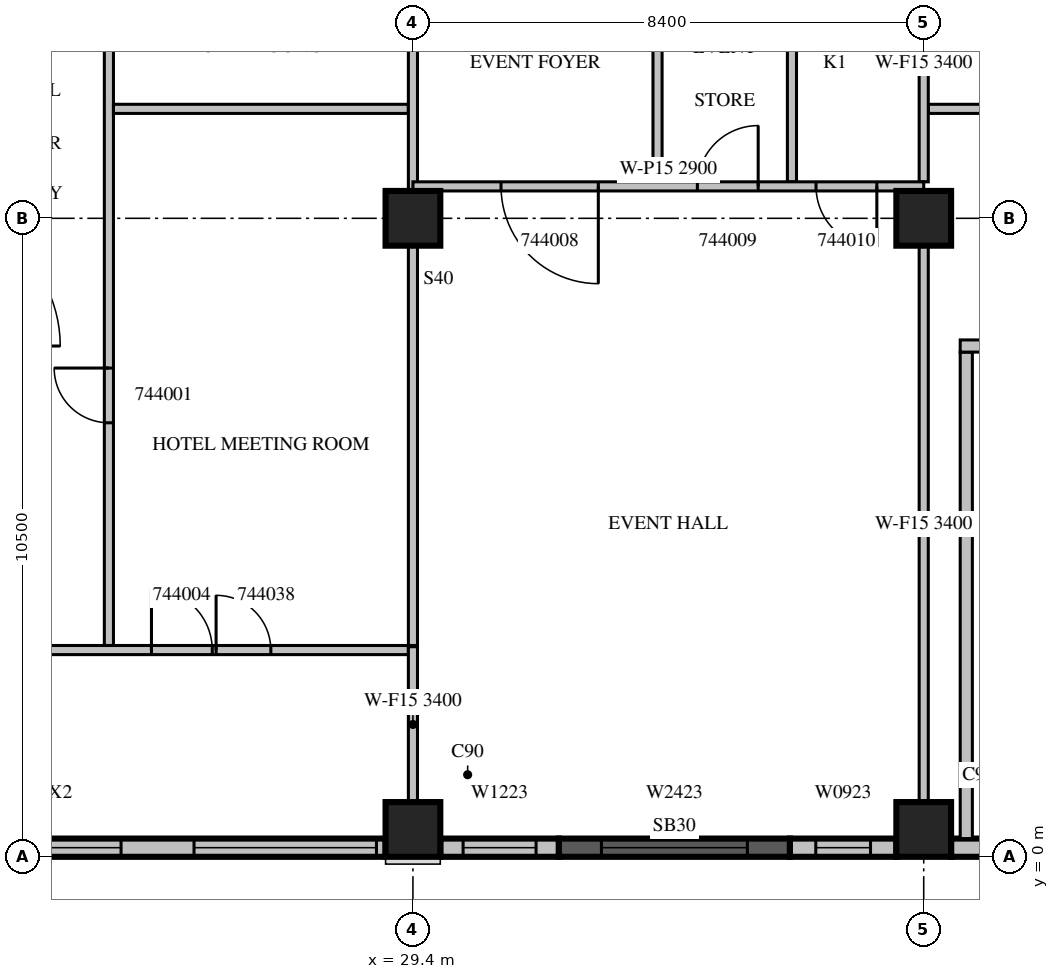
"""IFC4 building model, lengths in metres.
Left out: names, types, materials, properties, quantities, classifications, styles, units other than length and angle.
Written with IfcOpenShell. Run it as: python <this file> out.ifc"""

import sys

from ifc_helpers import new_model, si_unit, direction, frame, frame_2d, origin, origin_2d, place, context, subcontext, project, spatial, rectangle, extrude, source, transform, mapped, element, fill, save


model = new_model("IFC4")
c1 = context("Model", 3, precision=1e-05, world=origin(), true_north=direction((0.0, 1.0)))
c2 = subcontext(c1, "Body", "Model", "MODEL_VIEW")
j1 = project(units=[si_unit("LENGTHUNIT", "METRE"), si_unit("PLANEANGLEUNIT", "RADIAN")], contexts=[c1])
p1 = place(None, origin())
s1 = spatial("IfcSite", under=j1, at=p1, CompositionType="ELEMENT")
p2 = place(p1, origin())
s2 = spatial("IfcBuilding", under=s1, at=p2, CompositionType="ELEMENT")
p3 = place(p2, frame((0.0, 0.0, 200.6)))
s3 = spatial("IfcBuildingStorey", under=s2, at=p3, CompositionType="ELEMENT", Elevation=200.6)
m1 = source(origin(), c2, "Body", "SweptSolid", [
    extrude(rectangle(XDim=0.9, YDim=0.9, at=origin_2d()), origin(), (0.0, 0.0, 1.0), 3.8),
])
for number, where, z_axis, x_axis in (
    (1, (29.4, 0.45, 0.0), (0.0, 0.0, 1.0), (1.0, 0.0, 0.0)),
    (2, (37.8, 0.45, 0.0), (0.0, 0.0, 1.0), (1.0, 0.0, 0.0)),
    (3, (29.4, 10.5, 0.0), (0.0, 0.0, 1.0), (1.0, 0.0, 0.0)),
    (4, (37.8, 10.5, 0.0), (0.0, 0.0, 1.0), (1.0, 0.0, 0.0)),
):
    element("IfcColumn", number, at=place(p3, frame(where, z_axis=z_axis, x_axis=x_axis)), inside=s3, PredefinedType="COLUMN", context=c2, shape_type="MappedRepresentation", body=[
        mapped(m1, transform((0.0, 0.0, 0.0), scale=1.0)),
    ])
m2 = source(origin(), c2, "Body", "SweptSolid", [
    extrude(rectangle(XDim=7.5, YDim=0.3, at=frame_2d((3.75, 0.0))), origin(), (0.0, 0.0, 1.0), 3.4),
])
p4 = place(p3, frame((21.45, 0.15, 0.0), z_axis=(0.0, 0.0, 1.0), x_axis=(1.0, 0.0, 0.0)))
e5 = element("IfcWall", 5, at=p4, inside=s3, PredefinedType="STANDARD", context=c2, shape_type="MappedRepresentation", body=[
    mapped(m2, transform((0.0, 0.0, 0.0), scale=1.0)),
])
m3 = source(origin(), c2, "Body", "SweptSolid", [
    extrude(rectangle(XDim=3.0, YDim=2.3, at=frame_2d((1.5, 1.15))), frame((0.0, 0.16, 0.0), z_axis=(0.0, -1.0, 0.0), x_axis=(1.0, 0.0, 0.0)), (0.0, 0.0, 1.0), 0.32),
])
p5 = place(p4, frame((0.15, 0.0, 0.6)))
e6 = element("IfcOpeningElement", 6, at=p5, cuts=e5, PredefinedType="OPENING", context=c2, shape_type="MappedRepresentation", body=[
    mapped(m3, transform((0.0, 0.0, 0.0), scale=1.0)),
])
p6 = place(p4, frame((4.35, 0.0, 0.6)))
e7 = element("IfcOpeningElement", 7, at=p6, cuts=e5, PredefinedType="OPENING", context=c2, shape_type="MappedRepresentation", body=[
    mapped(m3, transform((0.0, 0.0, 0.0), scale=1.0)),
])
m4 = source(origin(), c2, "Body", "SweptSolid", [
    extrude(rectangle(XDim=1.95, YDim=0.3, at=frame_2d((0.975, 0.0))), origin(), (0.0, 0.0, 1.0), 3.4),
])
p7 = place(p3, frame((29.85, 0.15, 0.0), z_axis=(0.0, 0.0, 1.0), x_axis=(1.0, 0.0, 0.0)))
e8 = element("IfcWall", 8, at=p7, inside=s3, PredefinedType="STANDARD", context=c2, shape_type="MappedRepresentation", body=[
    mapped(m4, transform((0.0, 0.0, 0.0), scale=1.0)),
])
m5 = source(origin(), c2, "Body", "SweptSolid", [
    extrude(rectangle(XDim=1.2, YDim=2.3, at=frame_2d((0.6, 1.15))), frame((0.0, 0.16, 0.0), z_axis=(0.0, -1.0, 0.0), x_axis=(1.0, 0.0, 0.0)), (0.0, 0.0, 1.0), 0.32),
])
p8 = place(p7, frame((0.375, 0.0, 0.6)))
e9 = element("IfcOpeningElement", 9, at=p8, cuts=e8, PredefinedType="OPENING", context=c2, shape_type="MappedRepresentation", body=[
    mapped(m5, transform((0.0, 0.0, 0.0), scale=1.0)),
])
m6 = source(origin(), c2, "Body", "SweptSolid", [
    extrude(rectangle(XDim=3.8, YDim=0.3, at=frame_2d((1.9, 0.0))), origin(), (0.0, 0.0, 1.0), 3.4),
])
p9 = place(p3, frame((31.8, 0.15, 0.0), z_axis=(0.0, 0.0, 1.0), x_axis=(1.0, 0.0, 0.0)))
e10 = element("IfcWall", 10, at=p9, inside=s3, PredefinedType="SOLIDWALL", context=c2, shape_type="MappedRepresentation", body=[
    mapped(m6, transform((0.0, 0.0, 0.0), scale=1.0)),
])
m7 = source(origin(), c2, "Body", "SweptSolid", [
    extrude(rectangle(XDim=2.4, YDim=2.3, at=frame_2d((1.2, 1.15))), frame((0.0, 0.16, 0.0), z_axis=(0.0, -1.0, 0.0), x_axis=(1.0, 0.0, 0.0)), (0.0, 0.0, 1.0), 0.32),
])
p10 = place(p9, frame((0.7, 0.0, 0.6)))
e11 = element("IfcOpeningElement", 11, at=p10, cuts=e10, PredefinedType="OPENING", context=c2, shape_type="MappedRepresentation", body=[
    mapped(m7, transform((0.0, 0.0, 0.0), scale=1.0)),
])
m8 = source(origin(), c2, "Body", "SweptSolid", [
    extrude(rectangle(XDim=1.75, YDim=0.3, at=frame_2d((0.875, 0.0))), origin(), (0.0, 0.0, 1.0), 3.4),
])
p11 = place(p3, frame((35.6, 0.15, 0.0), z_axis=(0.0, 0.0, 1.0), x_axis=(1.0, 0.0, 0.0)))
e12 = element("IfcWall", 12, at=p11, inside=s3, PredefinedType="STANDARD", context=c2, shape_type="MappedRepresentation", body=[
    mapped(m8, transform((0.0, 0.0, 0.0), scale=1.0)),
])
m9 = source(origin(), c2, "Body", "SweptSolid", [
    extrude(rectangle(XDim=0.9, YDim=2.3, at=frame_2d((0.45, 1.15))), frame((0.0, 0.16, 0.0), z_axis=(0.0, -1.0, 0.0), x_axis=(1.0, 0.0, 0.0)), (0.0, 0.0, 1.0), 0.32),
])
p12 = place(p11, frame((0.425, 0.0, 0.6)))
e13 = element("IfcOpeningElement", 13, at=p12, cuts=e12, PredefinedType="OPENING", context=c2, shape_type="MappedRepresentation", body=[
    mapped(m9, transform((0.0, 0.0, 0.0), scale=1.0)),
])
p13 = place(p3, frame((38.25, 0.15, 0.0), z_axis=(0.0, 0.0, 1.0), x_axis=(1.0, 0.0, 0.0)))
e14 = element("IfcWall", 14, at=p13, inside=s3, PredefinedType="STANDARD", context=c2, shape_type="MappedRepresentation", body=[
    mapped(m4, transform((0.0, 0.0, 0.0), scale=1.0)),
])
m10 = source(origin(), c2, "Body", "SweptSolid", [
    extrude(rectangle(XDim=8.0, YDim=0.2, at=frame_2d((4.0, 0.0))), origin(), (0.0, 0.0, 1.0), 3.4),
])
p14 = place(p3, frame((38.5, 0.3, 0.0), z_axis=(0.0, 0.0, 1.0), x_axis=(0.0, 1.0, 0.0)))
e15 = element("IfcWall", 15, at=p14, inside=s3, PredefinedType="PARTITIONING", context=c2, shape_type="MappedRepresentation", body=[
    mapped(m10, transform((0.0, 0.0, 0.0), scale=1.0)),
])
m11 = source(origin(), c2, "Body", "SweptSolid", [
    extrude(rectangle(XDim=5.45, YDim=0.2, at=frame_2d((2.725, 0.0))), origin(), (0.0, 0.0, 1.0), 3.4),
])
p15 = place(p3, frame((38.4, 8.4, 0.0), z_axis=(0.0, 0.0, 1.0), x_axis=(1.0, 0.0, 0.0)))
e16 = element("IfcWall", 16, at=p15, inside=s3, PredefinedType="PARTITIONING", context=c2, shape_type="MappedRepresentation", body=[
    mapped(m11, transform((0.0, 0.0, 0.0), scale=1.0)),
])
m12 = source(origin(), c2, "Body", "SweptSolid", [
    extrude(rectangle(XDim=1.2, YDim=2.1, at=frame_2d((0.6, 1.05))), frame((0.0, 0.11, 0.0), z_axis=(0.0, -1.0, 0.0), x_axis=(1.0, 0.0, 0.0)), (0.0, 0.0, 1.0), 0.22),
])
p16 = place(p15, frame((0.4, 0.0, 0.0)))
e17 = element("IfcOpeningElement", 17, at=p16, cuts=e16, PredefinedType="OPENING", context=c2, shape_type="MappedRepresentation", body=[
    mapped(m12, transform((0.0, 0.0, 0.0), scale=1.0)),
])
m13 = source(origin(), c2, "Body", "SweptSolid", [
    extrude(rectangle(XDim=0.9, YDim=2.1, at=frame_2d((0.45, 1.05))), frame((0.0, 0.11, 0.0), z_axis=(0.0, -1.0, 0.0), x_axis=(1.0, 0.0, 0.0)), (0.0, 0.0, 1.0), 0.22),
])
p17 = place(p15, frame((3.25, 0.0, 0.0)))
e18 = element("IfcOpeningElement", 18, at=p17, cuts=e16, PredefinedType="OPENING", context=c2, shape_type="MappedRepresentation", body=[
    mapped(m13, transform((0.0, 0.0, 0.0), scale=1.0)),
])
m14 = source(origin(), c2, "Body", "SweptSolid", [
    extrude(rectangle(XDim=11.525, YDim=0.15, at=frame_2d((5.763, 0.0))), origin(), (0.0, 0.0, 1.0), 3.4),
])
p18 = place(p3, frame((24.4, 15.0, 0.0), z_axis=(0.0, 0.0, 1.0), x_axis=(0.0, -1.0, 0.0)))
e19 = element("IfcWall", 19, at=p18, inside=s3, PredefinedType="PARTITIONING", context=c2, shape_type="MappedRepresentation", body=[
    mapped(m14, transform((0.0, 0.0, 0.0), scale=1.0)),
])
m15 = source(origin(), c2, "Body", "SweptSolid", [
    extrude(rectangle(XDim=0.9, YDim=2.1, at=frame_2d((0.45, 1.05))), frame((0.0, 0.085, 0.0), z_axis=(0.0, -1.0, 0.0), x_axis=(1.0, 0.0, 0.0)), (0.0, 0.0, 1.0), 0.17),
])
p19 = place(p18, frame((6.963, 0.0, 0.0)))
e20 = element("IfcOpeningElement", 20, at=p19, cuts=e19, PredefinedType="OPENING", context=c2, shape_type="MappedRepresentation", body=[
    mapped(m15, transform((0.0, 0.0, 0.0), scale=1.0)),
])
p20 = place(p18, frame((0.325, 0.0, 0.0)))
e21 = element("IfcOpeningElement", 21, at=p20, cuts=e19, PredefinedType="OPENING", context=c2, shape_type="MappedRepresentation", body=[
    mapped(m15, transform((0.0, 0.0, 0.0), scale=1.0)),
])
p21 = place(p3, frame((29.325, 12.3, 0.0), z_axis=(0.0, 0.0, 1.0), x_axis=(-1.0, 0.0, 0.0)))
e22 = element("IfcWall", 22, at=p21, inside=s3, PredefinedType="PARTITIONING", context=c2, shape_type="SweptSolid", body=[
    extrude(rectangle(XDim=4.85, YDim=0.15, at=frame_2d((2.425, 0.0))), origin(), (0.0, 0.0, 1.0), 3.4),
])
m16 = source(origin(), c2, "Body", "SweptSolid", [
    extrude(rectangle(XDim=6.576, YDim=0.15, at=frame_2d((3.288, 0.0))), origin(), (0.0, 0.0, 1.0), 3.4),
])
p22 = place(p3, frame((29.4, 3.475, 0.0), z_axis=(0.0, 0.0, 1.0), x_axis=(0.0, 1.0, 0.0)))
e23 = element("IfcWall", 23, at=p22, inside=s3, PredefinedType="PARTITIONING", context=c2, shape_type="MappedRepresentation", body=[
    mapped(m16, transform((0.0, 0.0, 0.0), scale=1.0)),
])
m17 = source(origin(), c2, "Body", "SweptSolid", [
    extrude(rectangle(XDim=4.051, YDim=0.15, at=frame_2d((2.026, 0.0))), origin(), (0.0, 0.0, 1.0), 3.4),
])
p23 = place(p3, frame((29.4, 10.949, 0.0), z_axis=(0.0, 0.0, 1.0), x_axis=(0.0, 1.0, 0.0)))
e24 = element("IfcWall", 24, at=p23, inside=s3, PredefinedType="PARTITIONING", context=c2, shape_type="MappedRepresentation", body=[
    mapped(m17, transform((0.0, 0.0, 0.0), scale=1.0)),
])
m18 = source(origin(), c2, "Body", "SweptSolid", [
    extrude(rectangle(XDim=7.525, YDim=0.15, at=frame_2d((3.763, 0.0))), origin(), (0.0, 0.0, 1.0), 3.4),
])
p24 = place(p3, frame((21.8, 3.4, 0.0), z_axis=(0.0, 0.0, 1.0), x_axis=(1.0, 0.0, 0.0)))
e25 = element("IfcWall", 25, at=p24, inside=s3, PredefinedType="PARTITIONING", context=c2, shape_type="MappedRepresentation", body=[
    mapped(m18, transform((0.0, 0.0, 0.0), scale=1.0)),
])
m19 = source(origin(), c2, "Body", "SweptSolid", [
    extrude(rectangle(XDim=1.0, YDim=2.1, at=frame_2d((0.5, 1.05))), frame((0.0, 0.085, 0.0), z_axis=(0.0, -1.0, 0.0), x_axis=(1.0, 0.0, 0.0)), (0.0, 0.0, 1.0), 0.17),
])
p25 = place(p24, frame((3.3, 0.0, 0.0)))
e26 = element("IfcOpeningElement", 26, at=p25, cuts=e25, PredefinedType="OPENING", context=c2, shape_type="MappedRepresentation", body=[
    mapped(m19, transform((0.0, 0.0, 0.0), scale=1.0)),
])
p26 = place(p24, frame((4.363, 0.0, 0.0)))
e27 = element("IfcOpeningElement", 27, at=p26, cuts=e25, PredefinedType="OPENING", context=c2, shape_type="MappedRepresentation", body=[
    mapped(m15, transform((0.0, 0.0, 0.0), scale=1.0)),
])
m20 = source(origin(), c2, "Body", "SweptSolid", [
    extrude(rectangle(XDim=6.45, YDim=0.15, at=frame_2d((3.225, 0.0))), origin(), (0.0, 0.0, 1.0), 3.4),
])
p27 = place(p3, frame((37.875, 12.3, 0.0), z_axis=(0.0, 0.0, 1.0), x_axis=(1.0, 0.0, 0.0)))
e28 = element("IfcWall", 28, at=p27, inside=s3, PredefinedType="PARTITIONING", context=c2, shape_type="MappedRepresentation", body=[
    mapped(m20, transform((0.0, 0.0, 0.0), scale=1.0)),
])
m21 = source(origin(), c2, "Body", "SweptSolid", [
    extrude(rectangle(XDim=3.9, YDim=0.15, at=frame_2d((1.95, 0.0))), origin(), (0.0, 0.0, 1.0), 3.4),
])
for number, where, z_axis, x_axis in (
    (29, (33.422, 11.1, 0.0), (0.0, 0.0, 1.0), (0.0, 1.0, 0.0)),
    (30, (35.633, 11.1, 0.0), (0.0, 0.0, 1.0), (0.0, 1.0, 0.0)),
):
    element("IfcWall", number, at=place(p3, frame(where, z_axis=z_axis, x_axis=x_axis)), inside=s3, PredefinedType="PARTITIONING", context=c2, shape_type="MappedRepresentation", body=[
        mapped(m21, transform((0.0, 0.0, 0.0), scale=1.0)),
    ])
m22 = source(origin(), c2, "Body", "SweptSolid", [
    extrude(rectangle(XDim=2.556, YDim=0.15, at=frame_2d((1.278, 0.0))), origin(), (0.0, 0.0, 1.0), 3.4),
])
p28 = place(p3, frame((29.4, 0.899, 0.0), z_axis=(0.0, 0.0, 1.0), x_axis=(0.0, 1.0, 0.0)))
e31 = element("IfcWall", 31, at=p28, inside=s3, PredefinedType="PARTITIONING", context=c2, shape_type="MappedRepresentation", body=[
    mapped(m22, transform((0.0, 0.0, 0.0), scale=1.0)),
])
m23 = source(origin(), c2, "Body", "SweptSolid", [
    extrude(rectangle(XDim=9.152, YDim=0.15, at=frame_2d((4.576, 0.0))), origin(), (0.0, 0.0, 1.0), 3.4),
])
p29 = place(p3, frame((37.8, 0.899, 0.0), z_axis=(0.0, 0.0, 1.0), x_axis=(0.0, 1.0, 0.0)))
e32 = element("IfcWall", 32, at=p29, inside=s3, PredefinedType="PARTITIONING", context=c2, shape_type="MappedRepresentation", body=[
    mapped(m23, transform((0.0, 0.0, 0.0), scale=1.0)),
])
p30 = place(p3, frame((37.8, 11.1, 0.0), z_axis=(0.0, 0.0, 1.0), x_axis=(0.0, 1.0, 0.0)))
e33 = element("IfcWall", 33, at=p30, inside=s3, PredefinedType="PARTITIONING", context=c2, shape_type="MappedRepresentation", body=[
    mapped(m21, transform((0.0, 0.0, 0.0), scale=1.0)),
])
m24 = source(origin(), c2, "Body", "SweptSolid", [
    extrude(rectangle(XDim=8.4, YDim=0.15, at=frame_2d((4.2, 0.0))), origin(), (0.0, 0.0, 1.0), 2.9),
])
p31 = place(p3, frame((37.8, 11.025, 0.0), z_axis=(0.0, 0.0, 1.0), x_axis=(-1.0, 0.0, 0.0)))
e34 = element("IfcWall", 34, at=p31, inside=s3, PredefinedType="PARTITIONING", context=c2, shape_type="MappedRepresentation", body=[
    mapped(m24, transform((0.0, 0.0, 0.0), scale=1.0)),
])
m25 = source(origin(), c2, "Body", "SweptSolid", [
    extrude(rectangle(XDim=1.6, YDim=2.1, at=frame_2d((0.8, 1.05))), frame((0.0, 0.085, 0.0), z_axis=(0.0, -1.0, 0.0), x_axis=(1.0, 0.0, 0.0)), (0.0, 0.0, 1.0), 0.17),
])
p32 = place(p31, frame((5.351, 0.0, 0.0)))
e35 = element("IfcOpeningElement", 35, at=p32, cuts=e34, PredefinedType="OPENING", context=c2, shape_type="MappedRepresentation", body=[
    mapped(m25, transform((0.0, 0.0, 0.0), scale=1.0)),
])
p33 = place(p31, frame((2.722, 0.0, 0.0)))
e36 = element("IfcOpeningElement", 36, at=p33, cuts=e34, PredefinedType="OPENING", context=c2, shape_type="MappedRepresentation", body=[
    mapped(m19, transform((0.0, 0.0, 0.0), scale=1.0)),
])
p34 = place(p31, frame((0.771, 0.0, 0.0)))
e37 = element("IfcOpeningElement", 37, at=p34, cuts=e34, PredefinedType="OPENING", context=c2, shape_type="MappedRepresentation", body=[
    mapped(m19, transform((0.0, 0.0, 0.0), scale=1.0)),
])
m26 = source(origin(), c2, "Body", "SweptSolid", [
    extrude(rectangle(XDim=3.0, YDim=2.3, at=frame_2d((1.5, 1.15))), frame((0.0, 0.03, 0.0), z_axis=(0.0, -1.0, 0.0), x_axis=(1.0, 0.0, 0.0)), (0.0, 0.0, 1.0), 0.06),
])
p35 = place(p5, origin())
e38 = element("IfcWindow", 38, at=p35, inside=s3, PartitioningType="SINGLE_PANEL", PredefinedType="WINDOW", context=c2, shape_type="MappedRepresentation", body=[
    mapped(m26, transform((0.0, 0.0, 0.0), scale=1.0)),
])
fill(e6, e38)
p36 = place(p6, origin())
e39 = element("IfcWindow", 39, at=p36, inside=s3, PartitioningType="SINGLE_PANEL", PredefinedType="WINDOW", context=c2, shape_type="MappedRepresentation", body=[
    mapped(m26, transform((0.0, 0.0, 0.0), scale=1.0)),
])
fill(e7, e39)
m27 = source(origin(), c2, "Body", "SweptSolid", [
    extrude(rectangle(XDim=1.2, YDim=2.3, at=frame_2d((0.6, 1.15))), frame((0.0, 0.03, 0.0), z_axis=(0.0, -1.0, 0.0), x_axis=(1.0, 0.0, 0.0)), (0.0, 0.0, 1.0), 0.06),
])
p37 = place(p8, origin())
e40 = element("IfcWindow", 40, at=p37, inside=s3, PartitioningType="SINGLE_PANEL", PredefinedType="WINDOW", context=c2, shape_type="MappedRepresentation", body=[
    mapped(m27, transform((0.0, 0.0, 0.0), scale=1.0)),
])
fill(e9, e40)
m28 = source(origin(), c2, "Body", "SweptSolid", [
    extrude(rectangle(XDim=2.4, YDim=2.3, at=frame_2d((1.2, 1.15))), frame((0.0, 0.03, 0.0), z_axis=(0.0, -1.0, 0.0), x_axis=(1.0, 0.0, 0.0)), (0.0, 0.0, 1.0), 0.06),
])
p38 = place(p10, origin())
e41 = element("IfcWindow", 41, at=p38, inside=s3, PartitioningType="SINGLE_PANEL", PredefinedType="WINDOW", context=c2, shape_type="MappedRepresentation", body=[
    mapped(m28, transform((0.0, 0.0, 0.0), scale=1.0)),
])
fill(e11, e41)
m29 = source(origin(), c2, "Body", "SweptSolid", [
    extrude(rectangle(XDim=0.9, YDim=2.3, at=frame_2d((0.45, 1.15))), frame((0.0, 0.03, 0.0), z_axis=(0.0, -1.0, 0.0), x_axis=(1.0, 0.0, 0.0)), (0.0, 0.0, 1.0), 0.06),
])
p39 = place(p12, origin())
e42 = element("IfcWindow", 42, at=p39, inside=s3, PartitioningType="SINGLE_PANEL", PredefinedType="WINDOW", context=c2, shape_type="MappedRepresentation", body=[
    mapped(m29, transform((0.0, 0.0, 0.0), scale=1.0)),
])
fill(e13, e42)
m30 = source(origin(), c2, "Body", "SweptSolid", [
    extrude(rectangle(XDim=0.9, YDim=2.1, at=frame_2d((0.45, 1.05))), frame((0.0, 0.025, 0.0), z_axis=(0.0, -1.0, 0.0), x_axis=(1.0, 0.0, 0.0)), (0.0, 0.0, 1.0), 0.05),
])
p40 = place(p19, origin())
e43 = element("IfcDoor", 43, at=p40, inside=s3, OperationType="SINGLE_SWING_RIGHT", PredefinedType="DOOR", context=c2, shape_type="MappedRepresentation", body=[
    mapped(m30, transform((0.0, 0.0, 0.0), scale=1.0)),
])
fill(e20, e43)
m31 = source(origin(), c2, "Body", "SweptSolid", [
    extrude(rectangle(XDim=1.0, YDim=2.1, at=frame_2d((0.5, 1.05))), frame((0.0, 0.025, 0.0), z_axis=(0.0, -1.0, 0.0), x_axis=(1.0, 0.0, 0.0)), (0.0, 0.0, 1.0), 0.05),
])
p41 = place(p25, origin())
e44 = element("IfcDoor", 44, at=p41, inside=s3, OperationType="SINGLE_SWING_LEFT", PredefinedType="DOOR", context=c2, shape_type="MappedRepresentation", body=[
    mapped(m31, transform((0.0, 0.0, 0.0), scale=1.0)),
])
fill(e26, e44)
m32 = source(origin(), c2, "Body", "SweptSolid", [
    extrude(rectangle(XDim=1.6, YDim=2.1, at=frame_2d((0.8, 1.05))), frame((0.0, 0.025, 0.0), z_axis=(0.0, -1.0, 0.0), x_axis=(1.0, 0.0, 0.0)), (0.0, 0.0, 1.0), 0.05),
])
p42 = place(p32, origin())
e45 = element("IfcDoor", 45, at=p42, inside=s3, OperationType="SINGLE_SWING_LEFT", PredefinedType="DOOR", context=c2, shape_type="MappedRepresentation", body=[
    mapped(m32, transform((0.0, 0.0, 0.0), scale=1.0)),
])
fill(e35, e45)
p43 = place(p33, origin())
e46 = element("IfcDoor", 46, at=p43, inside=s3, OperationType="SINGLE_SWING_RIGHT", PredefinedType="DOOR", context=c2, shape_type="MappedRepresentation", body=[
    mapped(m31, transform((0.0, 0.0, 0.0), scale=1.0)),
])
fill(e36, e46)
p44 = place(p34, origin())
e47 = element("IfcDoor", 47, at=p44, inside=s3, OperationType="SINGLE_SWING_LEFT", PredefinedType="DOOR", context=c2, shape_type="MappedRepresentation", body=[
    mapped(m31, transform((0.0, 0.0, 0.0), scale=1.0)),
])
fill(e37, e47)
p45 = place(p26, origin())
e48 = element("IfcDoor", 48, at=p45, inside=s3, OperationType="SINGLE_SWING_LEFT", PredefinedType="DOOR", context=c2, shape_type="MappedRepresentation", body=[
    mapped(m30, transform((0.0, 0.0, 0.0), scale=1.0)),
])
fill(e27, e48)
save(model, sys.argv[1])
